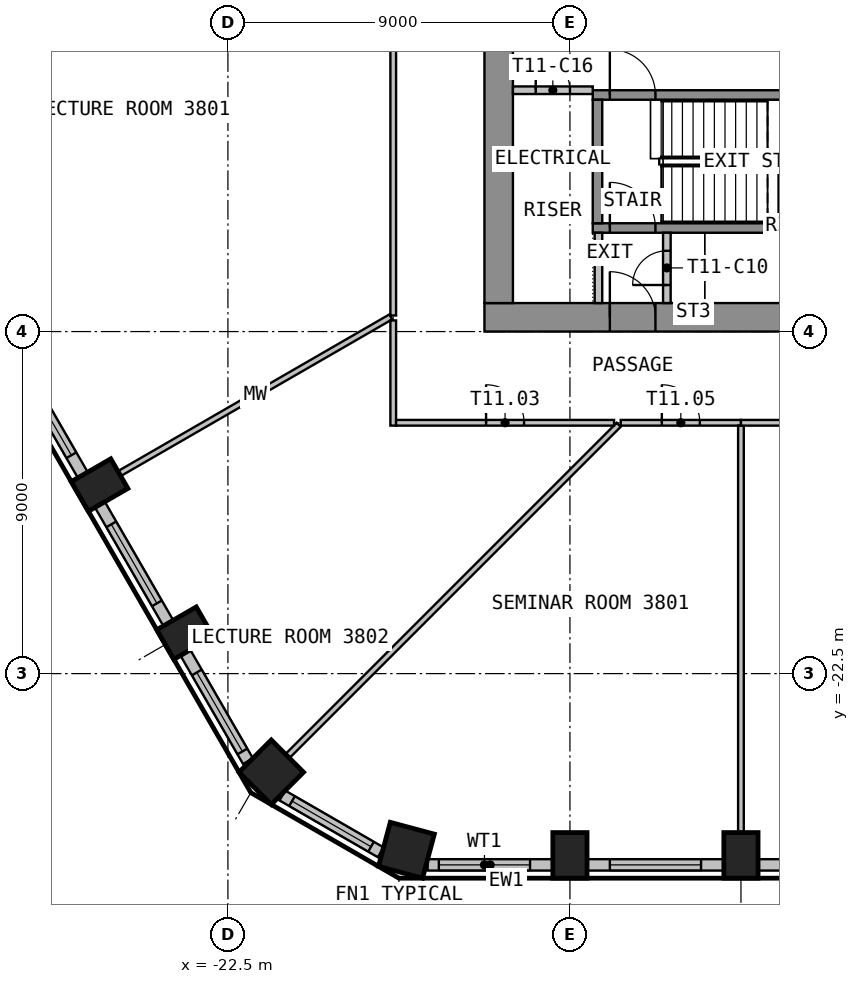
"""IFC4 building model, lengths in metres.
Left out: names, types, materials, properties, quantities, classifications, styles, units other than length and angle.
Written with IfcOpenShell. Run it as: python <this file> out.ifc"""

import sys

from ifc_helpers import new_model, si_unit, direction, frame, frame_2d, origin, origin_2d, place, context, subcontext, project, spatial, rectangle, extrude, element, fill, save


model = new_model("IFC4")
c1 = context("Model", 3, precision=1e-05, world=origin(), true_north=direction((0.0, 1.0)))
c2 = subcontext(c1, "Body", "Model", "MODEL_VIEW")
j1 = project(units=[si_unit("LENGTHUNIT", "METRE"), si_unit("PLANEANGLEUNIT", "RADIAN")], contexts=[c1])
p1 = place(None, origin())
s1 = spatial("IfcSite", under=j1, at=p1, CompositionType="ELEMENT")
p2 = place(p1, origin())
s2 = spatial("IfcBuilding", under=s1, at=p2, CompositionType="ELEMENT")
p3 = place(p2, frame((0.0, 0.0, 156.0)))
s3 = spatial("IfcBuildingStorey", under=s2, at=p3, CompositionType="ELEMENT", Elevation=156.0)
p4 = place(p3, frame((-17.803, -27.148, 0.0), z_axis=(0.0, 0.0, 1.0), x_axis=(0.965925826289, -0.258819045103, 0.0)))
e1 = element("IfcColumn", 1, at=p4, inside=s3, PredefinedType="COLUMN", context=c2, shape_type="SweptSolid", body=[
    extrude(rectangle(XDim=1.2, YDim=1.2, at=origin_2d()), origin(), (0.0, 0.0, 1.0), 3.575),
])
for number, where, z_axis, x_axis in (
    (2, (-13.5, -27.283, 0.0), (0.0, 0.0, 1.0), (1.0, 0.0, 0.0)),
    (3, (-9.0, -27.283, 0.0), (0.0, 0.0, 1.0), (1.0, 0.0, 0.0)),
    (4, (-25.877, -17.539, 0.0), (0.0, 0.0, 1.0), (0.5, -0.866, 0.0)),
    (5, (-23.627, -21.436, 0.0), (0.0, 0.0, 1.0), (0.5, -0.866, 0.0)),
):
    element("IfcColumn", number, at=place(p3, frame(where, z_axis=z_axis, x_axis=x_axis)), inside=s3, PredefinedType="COLUMN", context=c2, shape_type="SweptSolid", body=[
        extrude(rectangle(XDim=0.9, YDim=1.2, at=origin_2d()), origin(), (0.0, 0.0, 1.0), 3.575),
    ])
p5 = place(p3, frame((-21.359, -25.095, 0.0), z_axis=(0.0, 0.0, 1.0), x_axis=(0.707106781187, -0.707106781187, 0.0)))
e6 = element("IfcColumn", 6, at=p5, inside=s3, PredefinedType="COLUMN", context=c2, shape_type="SweptSolid", body=[
    extrude(rectangle(XDim=1.2, YDim=1.2, at=origin_2d()), origin(), (0.0, 0.0, 1.0), 3.575),
])
p6 = place(p3, frame((-17.245, -27.533, 0.0), z_axis=(0.0, 0.0, 1.0), x_axis=(1.0, 0.0, 0.0)))
e7 = element("IfcWall", 7, at=p6, inside=s3, PredefinedType="SOLIDWALL", context=c2, shape_type="SweptSolid", body=[
    extrude(rectangle(XDim=3.294, YDim=0.3, at=frame_2d((1.647, 0.0))), origin(), (0.0, 0.0, 1.0), 3.575),
])
p7 = place(p6, frame((0.295, 0.0, 0.9)))
e8 = element("IfcOpeningElement", 8, at=p7, cuts=e7, PredefinedType="OPENING", context=c2, shape_type="SweptSolid", body=[
    extrude(rectangle(XDim=2.4, YDim=2.1, at=frame_2d((1.2, 1.05))), frame((0.0, 0.16, 0.0), z_axis=(0.0, -1.0, 0.0), x_axis=(1.0, 0.0, 0.0)), (0.0, 0.0, 1.0), 0.32),
])
p8 = place(p3, frame((-13.05, -27.533, 0.0), z_axis=(0.0, 0.0, 1.0), x_axis=(1.0, 0.0, 0.0)))
e9 = element("IfcWall", 9, at=p8, inside=s3, PredefinedType="SOLIDWALL", context=c2, shape_type="SweptSolid", body=[
    extrude(rectangle(XDim=3.599, YDim=0.3, at=frame_2d((1.8, 0.0))), origin(), (0.0, 0.0, 1.0), 3.575),
])
p9 = place(p8, frame((0.6, 0.0, 0.9)))
e10 = element("IfcOpeningElement", 10, at=p9, cuts=e9, PredefinedType="OPENING", context=c2, shape_type="SweptSolid", body=[
    extrude(rectangle(XDim=2.4, YDim=2.1, at=frame_2d((1.2, 1.05))), frame((0.0, 0.16, 0.0), z_axis=(0.0, -1.0, 0.0), x_axis=(1.0, 0.0, 0.0)), (0.0, 0.0, 1.0), 0.32),
])
p10 = place(p3, frame((-8.55, -27.533, 0.0), z_axis=(0.0, 0.0, 1.0), x_axis=(1.0, 0.0, 0.0)))
e11 = element("IfcWall", 11, at=p10, inside=s3, PredefinedType="SOLIDWALL", context=c2, shape_type="SweptSolid", body=[
    extrude(rectangle(XDim=3.599, YDim=0.3, at=frame_2d((1.8, 0.0))), origin(), (0.0, 0.0, 1.0), 3.575),
])
p11 = place(p10, frame((0.6, 0.0, 0.9)))
e12 = element("IfcOpeningElement", 12, at=p11, cuts=e11, PredefinedType="OPENING", context=c2, shape_type="SweptSolid", body=[
    extrude(rectangle(XDim=2.4, YDim=2.1, at=frame_2d((1.2, 1.05))), frame((0.0, 0.16, 0.0), z_axis=(0.0, -1.0, 0.0), x_axis=(1.0, 0.0, 0.0)), (0.0, 0.0, 1.0), 0.32),
])
p12 = place(p3, frame((-28.119, -14.156, 0.0), z_axis=(0.0, 0.0, 1.0), x_axis=(0.500027802648, -0.866009351323, 0.0)))
e13 = element("IfcWall", 13, at=p12, inside=s3, PredefinedType="SOLIDWALL", context=c2, shape_type="SweptSolid", body=[
    extrude(rectangle(XDim=3.599, YDim=0.3, at=frame_2d((1.799, 0.0))), origin(), (0.0, 0.0, 1.0), 3.575),
])
p13 = place(p12, frame((0.6, 0.0, 0.9)))
e14 = element("IfcOpeningElement", 14, at=p13, cuts=e13, PredefinedType="OPENING", context=c2, shape_type="SweptSolid", body=[
    extrude(rectangle(XDim=2.4, YDim=2.1, at=frame_2d((1.2, 1.05))), frame((0.0, 0.16, 0.0), z_axis=(0.0, -1.0, 0.0), x_axis=(1.0, 0.0, 0.0)), (0.0, 0.0, 1.0), 0.32),
])
p14 = place(p3, frame((-25.869, -18.054, 0.0), z_axis=(0.0, 0.0, 1.0), x_axis=(0.500027802648, -0.866009351323, 0.0)))
e15 = element("IfcWall", 15, at=p14, inside=s3, PredefinedType="SOLIDWALL", context=c2, shape_type="SweptSolid", body=[
    extrude(rectangle(XDim=3.599, YDim=0.3, at=frame_2d((1.799, 0.0))), origin(), (0.0, 0.0, 1.0), 3.575),
])
p15 = place(p14, frame((0.6, 0.0, 0.9)))
e16 = element("IfcOpeningElement", 16, at=p15, cuts=e15, PredefinedType="OPENING", context=c2, shape_type="SweptSolid", body=[
    extrude(rectangle(XDim=2.4, YDim=2.1, at=frame_2d((1.2, 1.05))), frame((0.0, 0.16, 0.0), z_axis=(0.0, -1.0, 0.0), x_axis=(1.0, 0.0, 0.0)), (0.0, 0.0, 1.0), 0.32),
])
p16 = place(p3, frame((-23.619, -21.951, 0.0), z_axis=(0.0, 0.0, 1.0), x_axis=(0.500036802197, -0.866004154983, 0.0)))
e17 = element("IfcWall", 17, at=p16, inside=s3, PredefinedType="SOLIDWALL", context=c2, shape_type="SweptSolid", body=[
    extrude(rectangle(XDim=3.294, YDim=0.3, at=frame_2d((1.647, 0.0))), origin(), (0.0, 0.0, 1.0), 3.575),
])
p17 = place(p16, frame((0.6, 0.0, 0.9)))
e18 = element("IfcOpeningElement", 18, at=p17, cuts=e17, PredefinedType="OPENING", context=c2, shape_type="SweptSolid", body=[
    extrude(rectangle(XDim=2.4, YDim=2.1, at=frame_2d((1.2, 1.05))), frame((0.0, 0.16, 0.0), z_axis=(0.0, -1.0, 0.0), x_axis=(1.0, 0.0, 0.0)), (0.0, 0.0, 1.0), 0.32),
])
p18 = place(p3, frame((-21.068, -25.707, 0.0), z_axis=(0.0, 0.0, 1.0), x_axis=(0.866012844897, -0.500021752, 0.0)))
e19 = element("IfcWall", 19, at=p18, inside=s3, PredefinedType="SOLIDWALL", context=c2, shape_type="SweptSolid", body=[
    extrude(rectangle(XDim=2.989, YDim=0.3, at=frame_2d((1.495, 0.0))), origin(), (0.0, 0.0, 1.0), 3.575),
])
p19 = place(p18, frame((0.295, 0.0, 0.9)))
e20 = element("IfcOpeningElement", 20, at=p19, cuts=e19, PredefinedType="OPENING", context=c2, shape_type="SweptSolid", body=[
    extrude(rectangle(XDim=2.4, YDim=2.1, at=frame_2d((1.2, 1.05))), frame((0.0, 0.16, 0.0), z_axis=(0.0, -1.0, 0.0), x_axis=(1.0, 0.0, 0.0)), (0.0, 0.0, 1.0), 0.32),
])
p20 = place(p3, frame((-15.75, -13.125, 0.0), z_axis=(0.0, 0.0, 1.0), x_axis=(1.0, 0.0, 0.0)))
e21 = element("IfcWall", 21, at=p20, inside=s3, PredefinedType="SHEAR", context=c2, shape_type="SweptSolid", body=[
    extrude(rectangle(XDim=31.5, YDim=0.75, at=frame_2d((15.75, 0.0))), origin(), (0.0, 0.0, 1.0), 3.575),
])
p21 = place(p20, frame((14.55, 0.0, 0.0)))
e22 = element("IfcOpeningElement", 22, at=p21, cuts=e21, PredefinedType="OPENING", context=c2, shape_type="SweptSolid", body=[
    extrude(rectangle(XDim=2.4, YDim=2.1, at=frame_2d((1.2, 1.05))), frame((0.0, 0.385, 0.0), z_axis=(0.0, -1.0, 0.0), x_axis=(1.0, 0.0, 0.0)), (0.0, 0.0, 1.0), 0.77),
])
p22 = place(p20, frame((3.3, 0.0, 0.0)))
e23 = element("IfcOpeningElement", 23, at=p22, cuts=e21, PredefinedType="OPENING", context=c2, shape_type="SweptSolid", body=[
    extrude(rectangle(XDim=1.2, YDim=2.1, at=frame_2d((0.6, 1.05))), frame((0.0, 0.385, 0.0), z_axis=(0.0, -1.0, 0.0), x_axis=(1.0, 0.0, 0.0)), (0.0, 0.0, 1.0), 0.77),
])
p23 = place(p20, frame((27.0, 0.0, 0.0)))
e24 = element("IfcOpeningElement", 24, at=p23, cuts=e21, PredefinedType="OPENING", context=c2, shape_type="SweptSolid", body=[
    extrude(rectangle(XDim=1.2, YDim=2.1, at=frame_2d((0.6, 1.05))), frame((0.0, 0.385, 0.0), z_axis=(0.0, -1.0, 0.0), x_axis=(1.0, 0.0, 0.0)), (0.0, 0.0, 1.0), 0.77),
])
p24 = place(p3, frame((-15.375, -12.75, 0.0), z_axis=(0.0, 0.0, 1.0), x_axis=(0.0, 1.0, 0.0)))
e25 = element("IfcWall", 25, at=p24, inside=s3, PredefinedType="SHEAR", context=c2, shape_type="SweptSolid", body=[
    extrude(rectangle(XDim=25.5, YDim=0.75, at=frame_2d((12.75, 0.0))), origin(), (0.0, 0.0, 1.0), 3.575),
])
p25 = place(p24, frame((11.55, 0.0, 0.0)))
e26 = element("IfcOpeningElement", 26, at=p25, cuts=e25, PredefinedType="OPENING", context=c2, shape_type="SweptSolid", body=[
    extrude(rectangle(XDim=2.4, YDim=2.1, at=frame_2d((1.2, 1.05))), frame((0.0, 0.385, 0.0), z_axis=(0.0, -1.0, 0.0), x_axis=(1.0, 0.0, 0.0)), (0.0, 0.0, 1.0), 0.77),
])
p26 = place(p3, frame((-12.9, -10.775, 0.0), z_axis=(0.0, 0.0, 1.0), x_axis=(1.0, 0.0, 0.0)))
e27 = element("IfcWall", 27, at=p26, inside=s3, PredefinedType="SHEAR", context=c2, shape_type="SweptSolid", body=[
    extrude(rectangle(XDim=10.1, YDim=0.25, at=frame_2d((5.05, 0.0))), origin(), (0.0, 0.0, 1.0), 3.575),
])
p27 = place(p26, frame((0.45, 0.0, 0.0)))
e28 = element("IfcOpeningElement", 28, at=p27, cuts=e27, PredefinedType="OPENING", context=c2, shape_type="SweptSolid", body=[
    extrude(rectangle(XDim=1.2, YDim=2.1, at=frame_2d((0.6, 1.05))), frame((0.0, 0.135, 0.0), z_axis=(0.0, -1.0, 0.0), x_axis=(1.0, 0.0, 0.0)), (0.0, 0.0, 1.0), 0.27),
])
p28 = place(p3, frame((-12.9, -7.275, 0.0), z_axis=(0.0, 0.0, 1.0), x_axis=(1.0, 0.0, 0.0)))
e29 = element("IfcWall", 29, at=p28, inside=s3, PredefinedType="SHEAR", context=c2, shape_type="SweptSolid", body=[
    extrude(rectangle(XDim=10.1, YDim=0.25, at=frame_2d((5.05, 0.0))), origin(), (0.0, 0.0, 1.0), 3.575),
])
p29 = place(p28, frame((0.45, 0.0, 0.0)))
e30 = element("IfcOpeningElement", 30, at=p29, cuts=e29, PredefinedType="OPENING", context=c2, shape_type="SweptSolid", body=[
    extrude(rectangle(XDim=1.2, YDim=2.1, at=frame_2d((0.6, 1.05))), frame((0.0, 0.135, 0.0), z_axis=(0.0, -1.0, 0.0), x_axis=(1.0, 0.0, 0.0)), (0.0, 0.0, 1.0), 0.27),
])
p30 = place(p3, frame((-12.775, -10.65, 0.0), z_axis=(0.0, 0.0, 1.0), x_axis=(0.0, 1.0, 0.0)))
e31 = element("IfcWall", 31, at=p30, inside=s3, PredefinedType="SHEAR", context=c2, shape_type="SweptSolid", body=[
    extrude(rectangle(XDim=3.25, YDim=0.25, at=frame_2d((1.625, 0.0))), origin(), (0.0, 0.0, 1.0), 3.575),
])
p31 = place(p3, frame((-12.75, -12.75, 0.0), z_axis=(0.0, 0.0, 1.0), x_axis=(0.0, 1.0, 0.0)))
e32 = element("IfcWall", 32, at=p31, inside=s3, PredefinedType="PARTITIONING", context=c2, shape_type="SweptSolid", body=[
    extrude(rectangle(XDim=1.85, YDim=0.2, at=frame_2d((0.925, 0.0))), origin(), (0.0, 0.0, 1.0), 3.575),
])
p32 = place(p3, frame((-10.95, -12.75, 0.0), z_axis=(0.0, 0.0, 1.0), x_axis=(0.0, 1.0, 0.0)))
e33 = element("IfcWall", 33, at=p32, inside=s3, PredefinedType="PARTITIONING", context=c2, shape_type="SweptSolid", body=[
    extrude(rectangle(XDim=1.85, YDim=0.2, at=frame_2d((0.925, 0.0))), origin(), (0.0, 0.0, 1.0), 3.575),
])
p33 = place(p32, frame((0.475, 0.0, 0.0)))
e34 = element("IfcOpeningElement", 34, at=p33, cuts=e33, PredefinedType="OPENING", context=c2, shape_type="SweptSolid", body=[
    extrude(rectangle(XDim=0.9, YDim=2.1, at=frame_2d((0.45, 1.05))), frame((0.0, 0.11, 0.0), z_axis=(0.0, -1.0, 0.0), x_axis=(1.0, 0.0, 0.0)), (0.0, 0.0, 1.0), 0.22),
])
p34 = place(p3, frame((-15.0, -7.15, 0.0), z_axis=(0.0, 0.0, 1.0), x_axis=(1.0, 0.0, 0.0)))
e35 = element("IfcWall", 35, at=p34, inside=s3, PredefinedType="PARTITIONING", context=c2, shape_type="SweptSolid", body=[
    extrude(rectangle(XDim=2.1, YDim=0.2, at=frame_2d((1.05, 0.0))), origin(), (0.0, 0.0, 1.0), 3.575),
])
p35 = place(p34, frame((0.6, 0.0, 0.0)))
e36 = element("IfcOpeningElement", 36, at=p35, cuts=e35, PredefinedType="OPENING", context=c2, shape_type="SweptSolid", body=[
    extrude(rectangle(XDim=0.9, YDim=2.1, at=frame_2d((0.45, 1.05))), frame((0.0, 0.11, 0.0), z_axis=(0.0, -1.0, 0.0), x_axis=(1.0, 0.0, 0.0)), (0.0, 0.0, 1.0), 0.22),
])
p36 = place(p3, frame((-18.215, -13.115, 0.0), z_axis=(0.0, 0.0, 1.0), x_axis=(-0.866039823271, -0.499975023885, 0.0)))
e37 = element("IfcWall", 37, at=p36, inside=s3, PredefinedType="MOVABLE", context=c2, shape_type="SweptSolid", body=[
    extrude(rectangle(XDim=8.228, YDim=0.15, at=frame_2d((4.114, 0.0))), origin(), (0.0, 0.0, 1.0), 3.575),
])
p37 = place(p3, frame((-12.217, -15.953, 0.0), z_axis=(0.0, 0.0, 1.0), x_axis=(-0.707096863632, -0.707116698602, 0.0)))
e38 = element("IfcWall", 38, at=p37, inside=s3, PredefinedType="MOVABLE", context=c2, shape_type="SweptSolid", body=[
    extrude(rectangle(XDim=12.309, YDim=0.15, at=frame_2d((6.154, 0.0))), origin(), (0.0, 0.0, 1.0), 3.575),
])
p38 = place(p3, frame((-18.15, -13.207, 0.0), z_axis=(0.0, 0.0, 1.0), x_axis=(0.0, -1.0, 0.0)))
e39 = element("IfcWall", 39, at=p38, inside=s3, PredefinedType="PARTITIONING", context=c2, shape_type="SweptSolid", body=[
    extrude(rectangle(XDim=2.768, YDim=0.15, at=frame_2d((1.384, 0.0))), origin(), (0.0, 0.0, 1.0), 3.575),
])
p39 = place(p3, frame((-18.075, -15.9, 0.0), z_axis=(0.0, 0.0, 1.0), x_axis=(1.0, 0.0, 0.0)))
e40 = element("IfcWall", 40, at=p39, inside=s3, PredefinedType="PARTITIONING", context=c2, shape_type="SweptSolid", body=[
    extrude(rectangle(XDim=5.736, YDim=0.15, at=frame_2d((2.868, 0.0))), origin(), (0.0, 0.0, 1.0), 3.575),
])
p40 = place(p39, frame((2.368, 0.0, 0.0)))
e41 = element("IfcOpeningElement", 41, at=p40, cuts=e40, PredefinedType="OPENING", context=c2, shape_type="SweptSolid", body=[
    extrude(rectangle(XDim=1.0, YDim=2.1, at=frame_2d((0.5, 1.05))), frame((0.0, 0.085, 0.0), z_axis=(0.0, -1.0, 0.0), x_axis=(1.0, 0.0, 0.0)), (0.0, 0.0, 1.0), 0.17),
])
p41 = place(p3, frame((-18.15, -2.325, 0.0), z_axis=(0.0, 0.0, 1.0), x_axis=(0.0, -1.0, 0.0)))
e42 = element("IfcWall", 42, at=p41, inside=s3, PredefinedType="PARTITIONING", context=c2, shape_type="SweptSolid", body=[
    extrude(rectangle(XDim=10.752, YDim=0.15, at=frame_2d((5.376, 0.0))), origin(), (0.0, 0.0, 1.0), 3.575),
])
p42 = place(p3, frame((-12.164, -15.9, 0.0), z_axis=(0.0, 0.0, 1.0), x_axis=(1.0, 0.0, 0.0)))
e43 = element("IfcWall", 43, at=p42, inside=s3, PredefinedType="PARTITIONING", context=c2, shape_type="SweptSolid", body=[
    extrude(rectangle(XDim=3.164, YDim=0.15, at=frame_2d((1.582, 0.0))), origin(), (0.0, 0.0, 1.0), 3.575),
])
p43 = place(p42, frame((1.082, 0.0, 0.0)))
e44 = element("IfcOpeningElement", 44, at=p43, cuts=e43, PredefinedType="OPENING", context=c2, shape_type="SweptSolid", body=[
    extrude(rectangle(XDim=1.0, YDim=2.1, at=frame_2d((0.5, 1.05))), frame((0.0, 0.085, 0.0), z_axis=(0.0, -1.0, 0.0), x_axis=(1.0, 0.0, 0.0)), (0.0, 0.0, 1.0), 0.17),
])
p44 = place(p3, frame((-9.0, -15.975, 0.0), z_axis=(0.0, 0.0, 1.0), x_axis=(0.0, -1.0, 0.0)))
e45 = element("IfcWall", 45, at=p44, inside=s3, PredefinedType="MOVABLE", context=c2, shape_type="SweptSolid", body=[
    extrude(rectangle(XDim=10.688, YDim=0.15, at=frame_2d((5.344, 0.0))), origin(), (0.0, 0.0, 1.0), 3.575),
])
p45 = place(p3, frame((-9.0, -15.9, 0.0), z_axis=(0.0, 0.0, 1.0), x_axis=(1.0, 0.0, 0.0)))
e46 = element("IfcWall", 46, at=p45, inside=s3, PredefinedType="PARTITIONING", context=c2, shape_type="SweptSolid", body=[
    extrude(rectangle(XDim=13.5, YDim=0.15, at=frame_2d((6.75, 0.0))), origin(), (0.0, 0.0, 1.0), 3.575),
])
p46 = place(p45, frame((6.25, 0.0, 0.0)))
e47 = element("IfcOpeningElement", 47, at=p46, cuts=e46, PredefinedType="OPENING", context=c2, shape_type="SweptSolid", body=[
    extrude(rectangle(XDim=1.0, YDim=2.1, at=frame_2d((0.5, 1.05))), frame((0.0, 0.085, 0.0), z_axis=(0.0, -1.0, 0.0), x_axis=(1.0, 0.0, 0.0)), (0.0, 0.0, 1.0), 0.17),
])
p47 = place(p7, origin())
e48 = element("IfcWindow", 48, at=p47, inside=s3, PartitioningType="SINGLE_PANEL", PredefinedType="WINDOW", context=c2, shape_type="SweptSolid", body=[
    extrude(rectangle(XDim=2.4, YDim=2.1, at=frame_2d((1.2, 1.05))), frame((0.0, 0.03, 0.0), z_axis=(0.0, -1.0, 0.0), x_axis=(1.0, 0.0, 0.0)), (0.0, 0.0, 1.0), 0.06),
])
fill(e8, e48)
p48 = place(p9, origin())
e49 = element("IfcWindow", 49, at=p48, inside=s3, PartitioningType="SINGLE_PANEL", PredefinedType="WINDOW", context=c2, shape_type="SweptSolid", body=[
    extrude(rectangle(XDim=2.4, YDim=2.1, at=frame_2d((1.2, 1.05))), frame((0.0, 0.03, 0.0), z_axis=(0.0, -1.0, 0.0), x_axis=(1.0, 0.0, 0.0)), (0.0, 0.0, 1.0), 0.06),
])
fill(e10, e49)
p49 = place(p13, origin())
e50 = element("IfcWindow", 50, at=p49, inside=s3, PartitioningType="SINGLE_PANEL", PredefinedType="WINDOW", context=c2, shape_type="SweptSolid", body=[
    extrude(rectangle(XDim=2.4, YDim=2.1, at=frame_2d((1.2, 1.05))), frame((0.0, 0.03, 0.0), z_axis=(0.0, -1.0, 0.0), x_axis=(1.0, 0.0, 0.0)), (0.0, 0.0, 1.0), 0.06),
])
fill(e14, e50)
p50 = place(p15, origin())
e51 = element("IfcWindow", 51, at=p50, inside=s3, PartitioningType="SINGLE_PANEL", PredefinedType="WINDOW", context=c2, shape_type="SweptSolid", body=[
    extrude(rectangle(XDim=2.4, YDim=2.1, at=frame_2d((1.2, 1.05))), frame((0.0, 0.03, 0.0), z_axis=(0.0, -1.0, 0.0), x_axis=(1.0, 0.0, 0.0)), (0.0, 0.0, 1.0), 0.06),
])
fill(e16, e51)
p51 = place(p17, origin())
e52 = element("IfcWindow", 52, at=p51, inside=s3, PartitioningType="SINGLE_PANEL", PredefinedType="WINDOW", context=c2, shape_type="SweptSolid", body=[
    extrude(rectangle(XDim=2.4, YDim=2.1, at=frame_2d((1.2, 1.05))), frame((0.0, 0.03, 0.0), z_axis=(0.0, -1.0, 0.0), x_axis=(1.0, 0.0, 0.0)), (0.0, 0.0, 1.0), 0.06),
])
fill(e18, e52)
p52 = place(p19, origin())
e53 = element("IfcWindow", 53, at=p52, inside=s3, PartitioningType="SINGLE_PANEL", PredefinedType="WINDOW", context=c2, shape_type="SweptSolid", body=[
    extrude(rectangle(XDim=2.4, YDim=2.1, at=frame_2d((1.2, 1.05))), frame((0.0, 0.03, 0.0), z_axis=(0.0, -1.0, 0.0), x_axis=(1.0, 0.0, 0.0)), (0.0, 0.0, 1.0), 0.06),
])
fill(e20, e53)
p53 = place(p22, origin())
e54 = element("IfcDoor", 54, at=p53, inside=s3, OperationType="SINGLE_SWING_RIGHT", PredefinedType="DOOR", context=c2, shape_type="SweptSolid", body=[
    extrude(rectangle(XDim=1.2, YDim=2.1, at=frame_2d((0.6, 1.05))), frame((0.0, 0.025, 0.0), z_axis=(0.0, -1.0, 0.0), x_axis=(1.0, 0.0, 0.0)), (0.0, 0.0, 1.0), 0.05),
])
fill(e23, e54)
p54 = place(p29, origin())
e55 = element("IfcDoor", 55, at=p54, inside=s3, OperationType="SINGLE_SWING_LEFT", PredefinedType="DOOR", context=c2, shape_type="SweptSolid", body=[
    extrude(rectangle(XDim=1.2, YDim=2.1, at=frame_2d((0.6, 1.05))), frame((0.0, 0.025, 0.0), z_axis=(0.0, -1.0, 0.0), x_axis=(1.0, 0.0, 0.0)), (0.0, 0.0, 1.0), 0.05),
])
fill(e30, e55)
p55 = place(p27, origin())
e56 = element("IfcDoor", 56, at=p55, inside=s3, OperationType="SINGLE_SWING_RIGHT", PredefinedType="DOOR", context=c2, shape_type="SweptSolid", body=[
    extrude(rectangle(XDim=1.2, YDim=2.1, at=frame_2d((0.6, 1.05))), frame((0.0, 0.025, 0.0), z_axis=(0.0, -1.0, 0.0), x_axis=(1.0, 0.0, 0.0)), (0.0, 0.0, 1.0), 0.05),
])
fill(e28, e56)
p56 = place(p33, origin())
e57 = element("IfcDoor", 57, at=p56, inside=s3, OperationType="SINGLE_SWING_LEFT", PredefinedType="DOOR", context=c2, shape_type="SweptSolid", body=[
    extrude(rectangle(XDim=0.9, YDim=2.1, at=frame_2d((0.45, 1.05))), frame((0.0, 0.025, 0.0), z_axis=(0.0, -1.0, 0.0), x_axis=(1.0, 0.0, 0.0)), (0.0, 0.0, 1.0), 0.05),
])
fill(e34, e57)
p57 = place(p35, origin())
e58 = element("IfcDoor", 58, at=p57, inside=s3, OperationType="SINGLE_SWING_LEFT", PredefinedType="DOOR", context=c2, shape_type="SweptSolid", body=[
    extrude(rectangle(XDim=0.9, YDim=2.1, at=frame_2d((0.45, 1.05))), frame((0.0, 0.025, 0.0), z_axis=(0.0, -1.0, 0.0), x_axis=(1.0, 0.0, 0.0)), (0.0, 0.0, 1.0), 0.05),
])
fill(e36, e58)
p58 = place(p40, origin())
e59 = element("IfcDoor", 59, at=p58, inside=s3, OperationType="SINGLE_SWING_RIGHT", PredefinedType="DOOR", context=c2, shape_type="SweptSolid", body=[
    extrude(rectangle(XDim=1.0, YDim=2.1, at=frame_2d((0.5, 1.05))), frame((0.0, 0.025, 0.0), z_axis=(0.0, -1.0, 0.0), x_axis=(1.0, 0.0, 0.0)), (0.0, 0.0, 1.0), 0.05),
])
fill(e41, e59)
p59 = place(p43, origin())
e60 = element("IfcDoor", 60, at=p59, inside=s3, OperationType="SINGLE_SWING_RIGHT", PredefinedType="DOOR", context=c2, shape_type="SweptSolid", body=[
    extrude(rectangle(XDim=1.0, YDim=2.1, at=frame_2d((0.5, 1.05))), frame((0.0, 0.025, 0.0), z_axis=(0.0, -1.0, 0.0), x_axis=(1.0, 0.0, 0.0)), (0.0, 0.0, 1.0), 0.05),
])
fill(e44, e60)
save(model, sys.argv[1])
